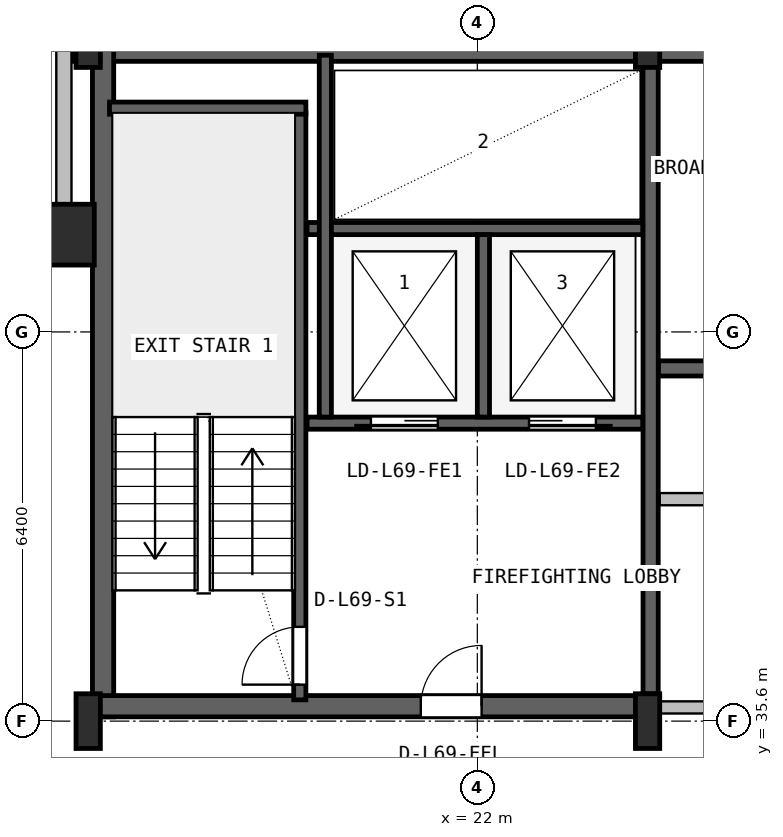
"""IFC4 building model, lengths in metres.
Left out: names, types, materials, properties, quantities, classifications, styles, units other than length and angle.
Written with IfcOpenShell. Run it as: python <this file> out.ifc"""

import sys

from ifc_helpers import new_model, si_unit, direction, frame, frame_2d, origin, origin_2d, place, context, subcontext, project, spatial, rectangle, hollow_rectangle, i_section, extrude, source, transform, mapped, element, fill, save


model = new_model("IFC4")
c1 = context("Model", 3, precision=1e-05, world=origin(), true_north=direction((0.0, 1.0)))
c2 = subcontext(c1, "Body", "Model", "MODEL_VIEW")
j1 = project(units=[si_unit("LENGTHUNIT", "METRE"), si_unit("PLANEANGLEUNIT", "RADIAN")], contexts=[c1])
p1 = place(None, origin())
s1 = spatial("IfcSite", under=j1, at=p1, CompositionType="ELEMENT")
p2 = place(p1, origin())
s2 = spatial("IfcBuilding", under=s1, at=p2, CompositionType="ELEMENT")
p3 = place(p2, frame((0.0, 0.0, 277.4)))
s3 = spatial("IfcBuildingStorey", under=s2, at=p3, CompositionType="ELEMENT", Elevation=277.4)
p4 = place(p3, frame((15.325, 46.625, 0.0), z_axis=(0.0, 0.0, 1.0), x_axis=(1.0, 0.0, 0.0)))
e1 = element("IfcWall", 1, at=p4, inside=s3, PredefinedType="SHEAR", context=c2, shape_type="SweptSolid", body=[
    extrude(rectangle(XDim=37.35, YDim=0.35, at=frame_2d((18.675, 0.0))), origin(), (0.0, 0.0, 1.0), 3.55),
])
p5 = place(p3, frame((15.845, 35.67, 0.0), z_axis=(0.0, 0.0, 1.0), x_axis=(0.0, 1.0, 0.0)))
e2 = element("IfcWall", 2, at=p5, inside=s3, PredefinedType="SHEAR", context=c2, shape_type="SweptSolid", body=[
    extrude(rectangle(XDim=11.13, YDim=0.35, at=frame_2d((5.565, 0.0))), origin(), (0.0, 0.0, 1.0), 3.55),
])
p6 = place(p3, frame((15.67, 35.845, 0.0), z_axis=(0.0, 0.0, 1.0), x_axis=(1.0, 0.0, 0.0)))
e3 = element("IfcWall", 3, at=p6, inside=s3, PredefinedType="SHEAR", context=c2, shape_type="SweptSolid", body=[
    extrude(rectangle(XDim=9.13, YDim=0.35, at=frame_2d((4.565, 0.0))), origin(), (0.0, 0.0, 1.0), 3.55),
])
p7 = place(p6, frame((5.4, 0.0, 0.0)))
e4 = element("IfcOpeningElement", 4, at=p7, cuts=e3, PredefinedType="OPENING", context=c2, shape_type="SweptSolid", body=[
    extrude(rectangle(XDim=1.0, YDim=2.1, at=frame_2d((0.5, 1.05))), frame((0.0, 0.185, 0.0), z_axis=(0.0, -1.0, 0.0), x_axis=(1.0, 0.0, 0.0)), (0.0, 0.0, 1.0), 0.37),
])
m1 = source(origin(), c2, "Body", "SweptSolid", [
    extrude(i_section(OverallWidth=0.4, OverallDepth=0.9, WebThickness=0.016, FlangeThickness=0.028, FilletRadius=0.016, at=origin_2d()), origin(), (0.0, 0.0, 1.0), 3.8),
])
for number, where, z_axis, x_axis in (
    (5, (15.6, 35.6, 0.0), (0.0, 0.0, 1.0), (1.0, 0.0, 0.0)),
    (6, (15.6, 46.8, 0.0), (0.0, 0.0, 1.0), (1.0, 0.0, 0.0)),
    (7, (24.8, 35.6, 0.0), (0.0, 0.0, 1.0), (1.0, 0.0, 0.0)),
    (8, (24.8, 46.8, 0.0), (0.0, 0.0, 1.0), (1.0, 0.0, 0.0)),
):
    element("IfcColumn", number, at=place(p3, frame(where, z_axis=z_axis, x_axis=x_axis)), inside=s3, PredefinedType="COLUMN", context=c2, shape_type="MappedRepresentation", body=[
        mapped(m1, transform((0.0, 0.0, 0.0), x_axis=(1.0, 0.0, 0.0), y_axis=(0.0, 1.0, 0.0), z_axis=(0.0, 0.0, 1.0), scale=1.0)),
    ])
m2 = source(origin(), c2, "Body", "SweptSolid", [
    extrude(hollow_rectangle(XDim=1.0, YDim=1.0, WallThickness=0.04, at=origin_2d()), origin(), (0.0, 0.0, 1.0), 3.8),
])
p8 = place(p3, frame((15.2, 43.6, 0.0), z_axis=(0.0, 0.0, 1.0), x_axis=(1.0, 0.0, 0.0)))
e9 = element("IfcColumn", 9, at=p8, inside=s3, PredefinedType="COLUMN", context=c2, shape_type="MappedRepresentation", body=[
    mapped(m2, transform((0.0, 0.0, 0.0), x_axis=(1.0, 0.0, 0.0), y_axis=(0.0, 1.0, 0.0), z_axis=(0.0, 0.0, 1.0), scale=1.0)),
])
p9 = place(p3, frame((12.08, 43.6, 0.0), z_axis=(0.0, 0.0, 1.0), x_axis=(1.0, 0.0, 0.0)))
e10 = element("IfcWall", 10, at=p9, inside=s3, PredefinedType="SOLIDWALL", context=c2, shape_type="SweptSolid", body=[
    extrude(rectangle(XDim=2.99, YDim=0.25, at=frame_2d((1.495, 0.0))), origin(), (0.0, 0.0, 1.0), 3.53),
])
p10 = place(p3, frame((15.2, 43.52, 0.0), z_axis=(0.0, 0.0, 1.0), x_axis=(0.0, 1.0, 0.0)))
e11 = element("IfcWall", 11, at=p10, inside=s3, PredefinedType="SOLIDWALL", context=c2, shape_type="SweptSolid", body=[
    extrude(rectangle(XDim=3.2, YDim=0.25, at=frame_2d((1.6, 0.0))), origin(), (0.0, 0.0, 1.0), 3.171),
])
p11 = place(p3, frame((19.08, 35.95, 0.0), z_axis=(0.0, 0.0, 1.0), x_axis=(0.0, 1.0, 0.0)))
e12 = element("IfcWall", 12, at=p11, inside=s3, PredefinedType="SHEAR", context=c2, shape_type="SweptSolid", body=[
    extrude(rectangle(XDim=9.65, YDim=0.2, at=frame_2d((4.825, 0.0))), origin(), (0.0, 0.0, 1.0), 3.55),
])
p12 = place(p11, frame((0.25, 0.0, 0.0)))
e13 = element("IfcOpeningElement", 13, at=p12, cuts=e12, PredefinedType="OPENING", context=c2, shape_type="SweptSolid", body=[
    extrude(rectangle(XDim=0.95, YDim=2.1, at=frame_2d((0.475, 1.05))), frame((0.0, 0.11, 0.0), z_axis=(0.0, -1.0, 0.0), x_axis=(1.0, 0.0, 0.0)), (0.0, 0.0, 1.0), 0.22),
])
p13 = place(p3, frame((15.95, 45.68, 0.0), z_axis=(0.0, 0.0, 1.0), x_axis=(1.0, 0.0, 0.0)))
e14 = element("IfcWall", 14, at=p13, inside=s3, PredefinedType="SHEAR", context=c2, shape_type="SweptSolid", body=[
    extrude(rectangle(XDim=3.23, YDim=0.2, at=frame_2d((1.615, 0.0))), origin(), (0.0, 0.0, 1.0), 3.55),
])
p14 = place(p3, frame((24.85, 36.05, 0.0), z_axis=(0.0, 0.0, 1.0), x_axis=(0.0, 1.0, 0.0)))
e15 = element("IfcWall", 15, at=p14, inside=s3, PredefinedType="SHEAR", context=c2, shape_type="SweptSolid", body=[
    extrude(rectangle(XDim=10.45, YDim=0.25, at=frame_2d((5.225, 0.0))), origin(), (0.0, 0.0, 1.0), 3.55),
])
p15 = place(p3, frame((19.2, 40.5, 0.0), z_axis=(0.0, 0.0, 1.0), x_axis=(1.0, 0.0, 0.0)))
e16 = element("IfcWall", 16, at=p15, inside=s3, PredefinedType="SHEAR", context=c2, shape_type="SweptSolid", body=[
    extrude(rectangle(XDim=5.52, YDim=0.2, at=frame_2d((2.76, 0.0))), origin(), (0.0, 0.0, 1.0), 3.55),
])
p16 = place(p15, frame((1.05, 0.0, 0.0)))
e17 = element("IfcOpeningElement", 17, at=p16, cuts=e16, PredefinedType="OPENING", context=c2, shape_type="SweptSolid", body=[
    extrude(rectangle(XDim=1.1, YDim=2.18, at=frame_2d((0.55, 1.09))), frame((0.0, 0.11, 0.0), z_axis=(0.0, -1.0, 0.0), x_axis=(1.0, 0.0, 0.0)), (0.0, 0.0, 1.0), 0.22),
])
p17 = place(p15, frame((3.65, 0.0, 0.0)))
e18 = element("IfcOpeningElement", 18, at=p17, cuts=e16, PredefinedType="OPENING", context=c2, shape_type="SweptSolid", body=[
    extrude(rectangle(XDim=1.1, YDim=2.18, at=frame_2d((0.55, 1.09))), frame((0.0, 0.11, 0.0), z_axis=(0.0, -1.0, 0.0), x_axis=(1.0, 0.0, 0.0)), (0.0, 0.0, 1.0), 0.22),
])
p18 = place(p3, frame((19.2, 43.7, 0.0), z_axis=(0.0, 0.0, 1.0), x_axis=(1.0, 0.0, 0.0)))
e19 = element("IfcWall", 19, at=p18, inside=s3, PredefinedType="SHEAR", context=c2, shape_type="SweptSolid", body=[
    extrude(rectangle(XDim=5.52, YDim=0.2, at=frame_2d((2.76, 0.0))), origin(), (0.0, 0.0, 1.0), 3.55),
])
p19 = place(p3, frame((22.1, 40.6, 0.0), z_axis=(0.0, 0.0, 1.0), x_axis=(0.0, 1.0, 0.0)))
e20 = element("IfcWall", 20, at=p19, inside=s3, PredefinedType="SHEAR", context=c2, shape_type="SweptSolid", body=[
    extrude(rectangle(XDim=3.0, YDim=0.2, at=frame_2d((1.5, 0.0))), origin(), (0.0, 0.0, 1.0), 3.55),
])
p20 = place(p3, frame((19.5, 40.6, 0.0), z_axis=(0.0, 0.0, 1.0), x_axis=(0.0, 1.0, 0.0)))
e21 = element("IfcWall", 21, at=p20, inside=s3, PredefinedType="SHEAR", context=c2, shape_type="SweptSolid", body=[
    extrude(rectangle(XDim=5.95, YDim=0.2, at=frame_2d((2.975, 0.0))), origin(), (0.0, 0.0, 1.0), 3.55),
])
p21 = place(p3, frame((24.98, 41.4, 0.0), z_axis=(0.0, 0.0, 1.0), x_axis=(1.0, 0.0, 0.0)))
e22 = element("IfcWall", 22, at=p21, inside=s3, PredefinedType="SHEAR", context=c2, shape_type="SweptSolid", body=[
    extrude(rectangle(XDim=23.82, YDim=0.25, at=frame_2d((11.91, 0.0))), origin(), (0.0, 0.0, 1.0), 3.55),
])
p22 = place(p21, frame((16.87, 0.0, 0.0)))
e23 = element("IfcOpeningElement", 23, at=p22, cuts=e22, PredefinedType="OPENING", context=c2, shape_type="SweptSolid", body=[
    extrude(rectangle(XDim=1.1, YDim=2.18, at=frame_2d((0.55, 1.09))), frame((0.0, 0.135, 0.0), z_axis=(0.0, -1.0, 0.0), x_axis=(1.0, 0.0, 0.0)), (0.0, 0.0, 1.0), 0.27),
])
p23 = place(p21, frame((19.47, 0.0, 0.0)))
e24 = element("IfcOpeningElement", 24, at=p23, cuts=e22, PredefinedType="OPENING", context=c2, shape_type="SweptSolid", body=[
    extrude(rectangle(XDim=1.1, YDim=2.18, at=frame_2d((0.55, 1.09))), frame((0.0, 0.135, 0.0), z_axis=(0.0, -1.0, 0.0), x_axis=(1.0, 0.0, 0.0)), (0.0, 0.0, 1.0), 0.27),
])
p24 = place(p21, frame((22.07, 0.0, 0.0)))
e25 = element("IfcOpeningElement", 25, at=p24, cuts=e22, PredefinedType="OPENING", context=c2, shape_type="SweptSolid", body=[
    extrude(rectangle(XDim=1.1, YDim=2.18, at=frame_2d((0.55, 1.09))), frame((0.0, 0.135, 0.0), z_axis=(0.0, -1.0, 0.0), x_axis=(1.0, 0.0, 0.0)), (0.0, 0.0, 1.0), 0.27),
])
p25 = place(p21, frame((3.56, 0.0, 0.0)))
e26 = element("IfcOpeningElement", 26, at=p25, cuts=e22, PredefinedType="OPENING", context=c2, shape_type="SweptSolid", body=[
    extrude(rectangle(XDim=1.0, YDim=2.08, at=frame_2d((0.5, 1.04))), frame((0.0, 0.135, 0.0), z_axis=(0.0, -1.0, 0.0), x_axis=(1.0, 0.0, 0.0)), (0.0, 0.0, 1.0), 0.27),
])
p26 = place(p21, frame((9.76, 0.0, 0.0)))
e27 = element("IfcOpeningElement", 27, at=p26, cuts=e22, PredefinedType="OPENING", context=c2, shape_type="SweptSolid", body=[
    extrude(rectangle(XDim=0.92, YDim=2.08, at=frame_2d((0.46, 1.04))), frame((0.0, 0.135, 0.0), z_axis=(0.0, -1.0, 0.0), x_axis=(1.0, 0.0, 0.0)), (0.0, 0.0, 1.0), 0.27),
])
p27 = place(p21, frame((13.66, 0.0, 0.0)))
e28 = element("IfcOpeningElement", 28, at=p27, cuts=e22, PredefinedType="OPENING", context=c2, shape_type="SweptSolid", body=[
    extrude(rectangle(XDim=0.92, YDim=2.08, at=frame_2d((0.46, 1.04))), frame((0.0, 0.135, 0.0), z_axis=(0.0, -1.0, 0.0), x_axis=(1.0, 0.0, 0.0)), (0.0, 0.0, 1.0), 0.27),
])
p28 = place(p3, frame((25.0, 35.825, 0.0), z_axis=(0.0, 0.0, 1.0), x_axis=(1.0, 0.0, 0.0)))
e29 = element("IfcWall", 29, at=p28, inside=s3, PredefinedType="PLUMBINGWALL", context=c2, shape_type="SweptSolid", body=[
    extrude(rectangle(XDim=9.75, YDim=0.2, at=frame_2d((4.875, 0.0))), origin(), (0.0, 0.0, 1.0), 2.575),
])
p29 = place(p3, frame((25.0, 39.25, 0.0), z_axis=(0.0, 0.0, 1.0), x_axis=(1.0, 0.0, 0.0)))
e30 = element("IfcWall", 30, at=p29, inside=s3, PredefinedType="PLUMBINGWALL", context=c2, shape_type="SweptSolid", body=[
    extrude(rectangle(XDim=9.75, YDim=0.2, at=frame_2d((4.875, 0.0))), origin(), (0.0, 0.0, 1.0), 3.53),
])
p30 = place(p29, frame((1.75, 0.0, 0.0)))
e31 = element("IfcOpeningElement", 31, at=p30, cuts=e30, PredefinedType="OPENING", context=c2, shape_type="SweptSolid", body=[
    extrude(rectangle(XDim=0.9, YDim=2.06, at=frame_2d((0.45, 1.03))), frame((0.0, 0.11, 0.0), z_axis=(0.0, -1.0, 0.0), x_axis=(1.0, 0.0, 0.0)), (0.0, 0.0, 1.0), 0.22),
])
p31 = place(p29, frame((6.725, 0.0, 0.0)))
e32 = element("IfcOpeningElement", 32, at=p31, cuts=e30, PredefinedType="OPENING", context=c2, shape_type="SweptSolid", body=[
    extrude(rectangle(XDim=0.9, YDim=2.06, at=frame_2d((0.45, 1.03))), frame((0.0, 0.11, 0.0), z_axis=(0.0, -1.0, 0.0), x_axis=(1.0, 0.0, 0.0)), (0.0, 0.0, 1.0), 0.22),
])
m3 = source(origin(), c2, "Body", "SweptSolid", [
    extrude(rectangle(XDim=0.95, YDim=2.1, at=frame_2d((0.475, 1.05))), frame((0.0, 0.025, 0.0), z_axis=(0.0, -1.0, 0.0), x_axis=(1.0, 0.0, 0.0)), (0.0, 0.0, 1.0), 0.05),
])
p32 = place(p12, origin())
e33 = element("IfcDoor", 33, at=p32, inside=s3, OperationType="SINGLE_SWING_LEFT", PredefinedType="DOOR", context=c2, shape_type="MappedRepresentation", body=[
    mapped(m3, transform((0.0, 0.0, 0.0), x_axis=(1.0, 0.0, 0.0), y_axis=(0.0, 1.0, 0.0), z_axis=(0.0, 0.0, 1.0), scale=1.0)),
])
fill(e13, e33)
m4 = source(origin(), c2, "Body", "SweptSolid", [
    extrude(rectangle(XDim=1.0, YDim=2.1, at=frame_2d((0.5, 1.05))), frame((0.0, 0.025, 0.0), z_axis=(0.0, -1.0, 0.0), x_axis=(1.0, 0.0, 0.0)), (0.0, 0.0, 1.0), 0.05),
])
p33 = place(p7, origin())
e34 = element("IfcDoor", 34, at=p33, inside=s3, OperationType="SINGLE_SWING_RIGHT", PredefinedType="DOOR", context=c2, shape_type="MappedRepresentation", body=[
    mapped(m4, transform((0.0, 0.0, 0.0), x_axis=(1.0, 0.0, 0.0), y_axis=(0.0, 1.0, 0.0), z_axis=(0.0, 0.0, 1.0), scale=1.0)),
])
fill(e4, e34)
m5 = source(origin(), c2, "Body", "SweptSolid", [
    extrude(rectangle(XDim=1.1, YDim=2.18, at=frame_2d((0.55, 1.09))), frame((0.0, 0.025, 0.0), z_axis=(0.0, -1.0, 0.0), x_axis=(1.0, 0.0, 0.0)), (0.0, 0.0, 1.0), 0.05),
])
p34 = place(p16, frame((1.1, 0.0, 0.0), z_axis=(0.0, 0.0, 1.0), x_axis=(-1.0, 0.0, 0.0)))
e35 = element("IfcDoor", 35, at=p34, inside=s3, OperationType="SLIDING_TO_LEFT", PredefinedType="DOOR", context=c2, shape_type="MappedRepresentation", body=[
    mapped(m5, transform((0.0, 0.0, 0.0), x_axis=(1.0, 0.0, 0.0), y_axis=(0.0, 1.0, 0.0), z_axis=(0.0, 0.0, 1.0), scale=1.0)),
])
fill(e17, e35)
p35 = place(p17, frame((1.1, 0.0, 0.0), z_axis=(0.0, 0.0, 1.0), x_axis=(-1.0, 0.0, 0.0)))
e36 = element("IfcDoor", 36, at=p35, inside=s3, OperationType="SLIDING_TO_RIGHT", PredefinedType="DOOR", context=c2, shape_type="MappedRepresentation", body=[
    mapped(m5, transform((0.0, 0.0, 0.0), x_axis=(1.0, 0.0, 0.0), y_axis=(0.0, 1.0, 0.0), z_axis=(0.0, 0.0, 1.0), scale=1.0)),
])
fill(e18, e36)
save(model, sys.argv[1])
